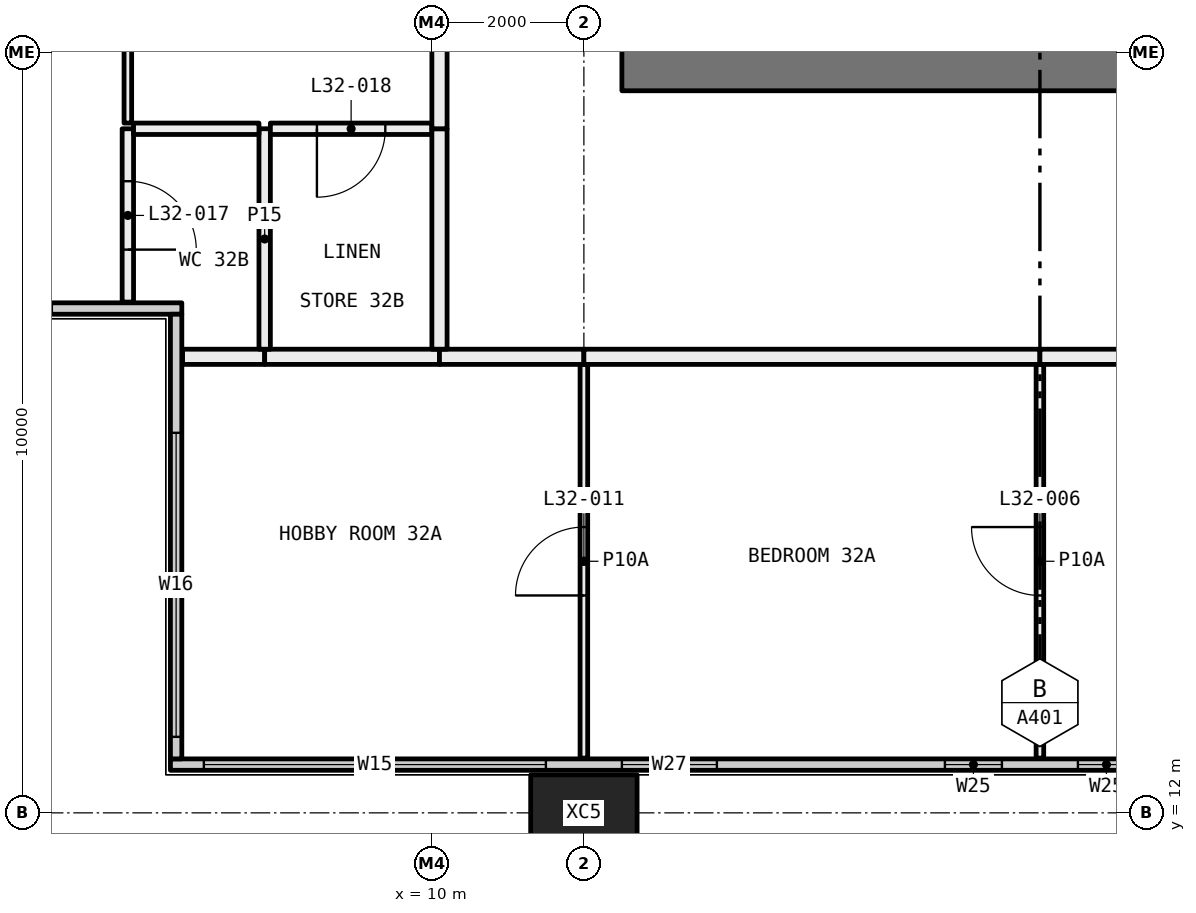
"""IFC4 building model, lengths in metres.
Left out: names, types, materials, properties, quantities, classifications, styles, units other than length and angle.
Written with IfcOpenShell. Run it as: python <this file> out.ifc"""

import sys

from ifc_helpers import new_model, si_unit, direction, frame, frame_2d, origin, origin_2d, place, context, subcontext, project, spatial, rectangle, hollow_rectangle, extrude, element, fill, save


model = new_model("IFC4")
c1 = context("Model", 3, precision=1e-05, world=origin(), true_north=direction((0.0, 1.0)))
c2 = subcontext(c1, "Body", "Model", "MODEL_VIEW")
j1 = project(units=[si_unit("LENGTHUNIT", "METRE"), si_unit("PLANEANGLEUNIT", "RADIAN")], contexts=[c1])
p1 = place(None, origin())
s1 = spatial("IfcSite", under=j1, at=p1, CompositionType="ELEMENT")
p2 = place(p1, origin())
s2 = spatial("IfcBuilding", under=s1, at=p2, CompositionType="ELEMENT")
p3 = place(p2, frame((0.0, 0.0, 124.2)))
s3 = spatial("IfcBuildingStorey", under=s2, at=p3, CompositionType="ELEMENT", Elevation=124.2)
p4 = place(p3, frame((12.0, 12.0, -0.4), z_axis=(0.0, 0.0, 1.0), x_axis=(1.0, 0.0, 0.0)))
e1 = element("IfcColumn", 1, at=p4, inside=s3, PredefinedType="COLUMN", context=c2, shape_type="SweptSolid", body=[
    extrude(hollow_rectangle(XDim=1.4, YDim=1.0, WallThickness=0.055, at=origin_2d()), origin(), (0.0, 0.0, 1.0), 3.45),
])
p5 = place(p3, frame((6.56, 12.635, 0.0), z_axis=(0.0, 0.0, 1.0), x_axis=(1.0, 0.0, 0.0)))
e2 = element("IfcWall", 2, at=p5, inside=s3, PredefinedType="ELEMENTEDWALL", context=c2, shape_type="SweptSolid", body=[
    extrude(rectangle(XDim=58.88, YDim=0.15, at=frame_2d((29.44, 0.0))), origin(), (0.0, 0.0, 1.0), 3.05),
])
p6 = place(p5, frame((0.44, 0.0, 0.45)))
e3 = element("IfcOpeningElement", 3, at=p6, cuts=e2, PredefinedType="OPENING", context=c2, shape_type="SweptSolid", body=[
    extrude(rectangle(XDim=4.5, YDim=2.55, at=frame_2d((2.25, 1.275))), frame((0.0, 0.085, 0.0), z_axis=(0.0, -1.0, 0.0), x_axis=(1.0, 0.0, 0.0)), (0.0, 0.0, 1.0), 0.17),
])
p7 = place(p5, frame((5.94, 0.0, 0.45)))
e4 = element("IfcOpeningElement", 4, at=p7, cuts=e2, PredefinedType="OPENING", context=c2, shape_type="SweptSolid", body=[
    extrude(rectangle(XDim=1.25, YDim=2.55, at=frame_2d((0.625, 1.275))), frame((0.0, 0.085, 0.0), z_axis=(0.0, -1.0, 0.0), x_axis=(1.0, 0.0, 0.0)), (0.0, 0.0, 1.0), 0.17),
])
p8 = place(p5, frame((10.19, 0.0, 0.45)))
e5 = element("IfcOpeningElement", 5, at=p8, cuts=e2, PredefinedType="OPENING", context=c2, shape_type="SweptSolid", body=[
    extrude(rectangle(XDim=0.75, YDim=2.55, at=frame_2d((0.375, 1.275))), frame((0.0, 0.085, 0.0), z_axis=(0.0, -1.0, 0.0), x_axis=(1.0, 0.0, 0.0)), (0.0, 0.0, 1.0), 0.17),
])
p9 = place(p5, frame((11.94, 0.0, 0.45)))
e6 = element("IfcOpeningElement", 6, at=p9, cuts=e2, PredefinedType="OPENING", context=c2, shape_type="SweptSolid", body=[
    extrude(rectangle(XDim=0.75, YDim=2.55, at=frame_2d((0.375, 1.275))), frame((0.0, 0.085, 0.0), z_axis=(0.0, -1.0, 0.0), x_axis=(1.0, 0.0, 0.0)), (0.0, 0.0, 1.0), 0.17),
])
p10 = place(p5, frame((15.69, 0.0, 0.45)))
e7 = element("IfcOpeningElement", 7, at=p10, cuts=e2, PredefinedType="OPENING", context=c2, shape_type="SweptSolid", body=[
    extrude(rectangle(XDim=1.25, YDim=2.55, at=frame_2d((0.625, 1.275))), frame((0.0, 0.085, 0.0), z_axis=(0.0, -1.0, 0.0), x_axis=(1.0, 0.0, 0.0)), (0.0, 0.0, 1.0), 0.17),
])
p11 = place(p5, frame((17.94, 0.0, 0.45)))
e8 = element("IfcOpeningElement", 8, at=p11, cuts=e2, PredefinedType="OPENING", context=c2, shape_type="SweptSolid", body=[
    extrude(rectangle(XDim=1.25, YDim=2.55, at=frame_2d((0.625, 1.275))), frame((0.0, 0.085, 0.0), z_axis=(0.0, -1.0, 0.0), x_axis=(1.0, 0.0, 0.0)), (0.0, 0.0, 1.0), 0.17),
])
p12 = place(p5, frame((22.19, 0.0, 0.45)))
e9 = element("IfcOpeningElement", 9, at=p12, cuts=e2, PredefinedType="OPENING", context=c2, shape_type="SweptSolid", body=[
    extrude(rectangle(XDim=0.75, YDim=2.55, at=frame_2d((0.375, 1.275))), frame((0.0, 0.085, 0.0), z_axis=(0.0, -1.0, 0.0), x_axis=(1.0, 0.0, 0.0)), (0.0, 0.0, 1.0), 0.17),
])
p13 = place(p5, frame((23.94, 0.0, 0.45)))
e10 = element("IfcOpeningElement", 10, at=p13, cuts=e2, PredefinedType="OPENING", context=c2, shape_type="SweptSolid", body=[
    extrude(rectangle(XDim=0.75, YDim=2.55, at=frame_2d((0.375, 1.275))), frame((0.0, 0.085, 0.0), z_axis=(0.0, -1.0, 0.0), x_axis=(1.0, 0.0, 0.0)), (0.0, 0.0, 1.0), 0.17),
])
p14 = place(p5, frame((27.69, 0.0, 0.45)))
e11 = element("IfcOpeningElement", 11, at=p14, cuts=e2, PredefinedType="OPENING", context=c2, shape_type="SweptSolid", body=[
    extrude(rectangle(XDim=1.25, YDim=2.55, at=frame_2d((0.625, 1.275))), frame((0.0, 0.085, 0.0), z_axis=(0.0, -1.0, 0.0), x_axis=(1.0, 0.0, 0.0)), (0.0, 0.0, 1.0), 0.17),
])
p15 = place(p5, frame((29.94, 0.0, 0.45)))
e12 = element("IfcOpeningElement", 12, at=p15, cuts=e2, PredefinedType="OPENING", context=c2, shape_type="SweptSolid", body=[
    extrude(rectangle(XDim=1.25, YDim=2.55, at=frame_2d((0.625, 1.275))), frame((0.0, 0.085, 0.0), z_axis=(0.0, -1.0, 0.0), x_axis=(1.0, 0.0, 0.0)), (0.0, 0.0, 1.0), 0.17),
])
p16 = place(p5, frame((34.19, 0.0, 0.45)))
e13 = element("IfcOpeningElement", 13, at=p16, cuts=e2, PredefinedType="OPENING", context=c2, shape_type="SweptSolid", body=[
    extrude(rectangle(XDim=0.75, YDim=2.55, at=frame_2d((0.375, 1.275))), frame((0.0, 0.085, 0.0), z_axis=(0.0, -1.0, 0.0), x_axis=(1.0, 0.0, 0.0)), (0.0, 0.0, 1.0), 0.17),
])
p17 = place(p5, frame((35.94, 0.0, 0.45)))
e14 = element("IfcOpeningElement", 14, at=p17, cuts=e2, PredefinedType="OPENING", context=c2, shape_type="SweptSolid", body=[
    extrude(rectangle(XDim=0.75, YDim=2.55, at=frame_2d((0.375, 1.275))), frame((0.0, 0.085, 0.0), z_axis=(0.0, -1.0, 0.0), x_axis=(1.0, 0.0, 0.0)), (0.0, 0.0, 1.0), 0.17),
])
p18 = place(p5, frame((39.69, 0.0, 0.45)))
e15 = element("IfcOpeningElement", 15, at=p18, cuts=e2, PredefinedType="OPENING", context=c2, shape_type="SweptSolid", body=[
    extrude(rectangle(XDim=1.25, YDim=2.55, at=frame_2d((0.625, 1.275))), frame((0.0, 0.085, 0.0), z_axis=(0.0, -1.0, 0.0), x_axis=(1.0, 0.0, 0.0)), (0.0, 0.0, 1.0), 0.17),
])
p19 = place(p5, frame((41.94, 0.0, 0.45)))
e16 = element("IfcOpeningElement", 16, at=p19, cuts=e2, PredefinedType="OPENING", context=c2, shape_type="SweptSolid", body=[
    extrude(rectangle(XDim=1.25, YDim=2.55, at=frame_2d((0.625, 1.275))), frame((0.0, 0.085, 0.0), z_axis=(0.0, -1.0, 0.0), x_axis=(1.0, 0.0, 0.0)), (0.0, 0.0, 1.0), 0.17),
])
p20 = place(p5, frame((46.19, 0.0, 0.45)))
e17 = element("IfcOpeningElement", 17, at=p20, cuts=e2, PredefinedType="OPENING", context=c2, shape_type="SweptSolid", body=[
    extrude(rectangle(XDim=0.75, YDim=2.55, at=frame_2d((0.375, 1.275))), frame((0.0, 0.085, 0.0), z_axis=(0.0, -1.0, 0.0), x_axis=(1.0, 0.0, 0.0)), (0.0, 0.0, 1.0), 0.17),
])
p21 = place(p5, frame((47.94, 0.0, 0.45)))
e18 = element("IfcOpeningElement", 18, at=p21, cuts=e2, PredefinedType="OPENING", context=c2, shape_type="SweptSolid", body=[
    extrude(rectangle(XDim=0.75, YDim=2.55, at=frame_2d((0.375, 1.275))), frame((0.0, 0.085, 0.0), z_axis=(0.0, -1.0, 0.0), x_axis=(1.0, 0.0, 0.0)), (0.0, 0.0, 1.0), 0.17),
])
p22 = place(p5, frame((51.69, 0.0, 0.45)))
e19 = element("IfcOpeningElement", 19, at=p22, cuts=e2, PredefinedType="OPENING", context=c2, shape_type="SweptSolid", body=[
    extrude(rectangle(XDim=1.25, YDim=2.55, at=frame_2d((0.625, 1.275))), frame((0.0, 0.085, 0.0), z_axis=(0.0, -1.0, 0.0), x_axis=(1.0, 0.0, 0.0)), (0.0, 0.0, 1.0), 0.17),
])
p23 = place(p5, frame((53.94, 0.0, 0.45)))
e20 = element("IfcOpeningElement", 20, at=p23, cuts=e2, PredefinedType="OPENING", context=c2, shape_type="SweptSolid", body=[
    extrude(rectangle(XDim=4.5, YDim=2.55, at=frame_2d((2.25, 1.275))), frame((0.0, 0.085, 0.0), z_axis=(0.0, -1.0, 0.0), x_axis=(1.0, 0.0, 0.0)), (0.0, 0.0, 1.0), 0.17),
])
p24 = place(p3, frame((0.56, 18.635, 0.0), z_axis=(0.0, 0.0, 1.0), x_axis=(1.0, 0.0, 0.0)))
e21 = element("IfcWall", 21, at=p24, inside=s3, PredefinedType="ELEMENTEDWALL", context=c2, shape_type="SweptSolid", body=[
    extrude(rectangle(XDim=6.15, YDim=0.15, at=frame_2d((3.075, 0.0))), origin(), (0.0, 0.0, 1.0), 3.05),
])
p25 = place(p24, frame((0.44, 0.0, 0.45)))
e22 = element("IfcOpeningElement", 22, at=p25, cuts=e21, PredefinedType="OPENING", context=c2, shape_type="SweptSolid", body=[
    extrude(rectangle(XDim=4.0, YDim=2.55, at=frame_2d((2.0, 1.275))), frame((0.0, 0.085, 0.0), z_axis=(0.0, -1.0, 0.0), x_axis=(1.0, 0.0, 0.0)), (0.0, 0.0, 1.0), 0.17),
])
p26 = place(p3, frame((6.635, 12.71, 0.0), z_axis=(0.0, 0.0, 1.0), x_axis=(0.0, 1.0, 0.0)))
e23 = element("IfcWall", 23, at=p26, inside=s3, PredefinedType="ELEMENTEDWALL", context=c2, shape_type="SweptSolid", body=[
    extrude(rectangle(XDim=5.85, YDim=0.15, at=frame_2d((2.925, 0.0))), origin(), (0.0, 0.0, 1.0), 3.05),
])
p27 = place(p26, frame((0.29, 0.0, 0.45)))
e24 = element("IfcOpeningElement", 24, at=p27, cuts=e23, PredefinedType="OPENING", context=c2, shape_type="SweptSolid", body=[
    extrude(rectangle(XDim=4.0, YDim=2.55, at=frame_2d((2.0, 1.275))), frame((0.0, 0.085, 0.0), z_axis=(0.0, -1.0, 0.0), x_axis=(1.0, 0.0, 0.0)), (0.0, 0.0, 1.0), 0.17),
])
p28 = place(p3, frame((12.0, 12.72, 0.0), z_axis=(0.0, 0.0, 1.0), x_axis=(0.0, 1.0, 0.0)))
e25 = element("IfcWall", 25, at=p28, inside=s3, PredefinedType="PARTITIONING", context=c2, shape_type="SweptSolid", body=[
    extrude(rectangle(XDim=5.18, YDim=0.1, at=frame_2d((2.59, 0.0))), origin(), (0.0, 0.0, 1.0), 3.05),
])
p29 = place(p28, frame((2.14, 0.0, 0.0)))
e26 = element("IfcOpeningElement", 26, at=p29, cuts=e25, PredefinedType="OPENING", context=c2, shape_type="SweptSolid", body=[
    extrude(rectangle(XDim=0.9, YDim=2.1, at=frame_2d((0.45, 1.05))), frame((0.0, 0.06, 0.0), z_axis=(0.0, -1.0, 0.0), x_axis=(1.0, 0.0, 0.0)), (0.0, 0.0, 1.0), 0.12),
])
p30 = place(p3, frame((7.8, 18.0, 0.0), z_axis=(0.0, 0.0, 1.0), x_axis=(-1.0, 0.0, 0.0)))
e27 = element("IfcWall", 27, at=p30, inside=s3, PredefinedType="PARTITIONING", context=c2, shape_type="SweptSolid", body=[
    extrude(rectangle(XDim=1.08, YDim=0.2, at=frame_2d((0.54, 0.0))), origin(), (0.0, 0.0, 1.0), 3.05),
])
p31 = place(p3, frame((10.1, 18.0, 0.0), z_axis=(0.0, 0.0, 1.0), x_axis=(-1.0, 0.0, 0.0)))
e28 = element("IfcWall", 28, at=p31, inside=s3, PredefinedType="PARTITIONING", context=c2, shape_type="SweptSolid", body=[
    extrude(rectangle(XDim=2.3, YDim=0.2, at=frame_2d((1.15, 0.0))), origin(), (0.0, 0.0, 1.0), 3.05),
])
p32 = place(p3, frame((12.0, 18.0, 0.0), z_axis=(0.0, 0.0, 1.0), x_axis=(-1.0, 0.0, 0.0)))
e29 = element("IfcWall", 29, at=p32, inside=s3, PredefinedType="PARTITIONING", context=c2, shape_type="SweptSolid", body=[
    extrude(rectangle(XDim=1.9, YDim=0.2, at=frame_2d((0.95, 0.0))), origin(), (0.0, 0.0, 1.0), 3.05),
])
p33 = place(p3, frame((18.0, 12.72, 0.0), z_axis=(0.0, 0.0, 1.0), x_axis=(0.0, 1.0, 0.0)))
e30 = element("IfcWall", 30, at=p33, inside=s3, PredefinedType="PARTITIONING", context=c2, shape_type="SweptSolid", body=[
    extrude(rectangle(XDim=5.18, YDim=0.1, at=frame_2d((2.59, 0.0))), origin(), (0.0, 0.0, 1.0), 3.05),
])
p34 = place(p33, frame((2.14, 0.0, 0.0)))
e31 = element("IfcOpeningElement", 31, at=p34, cuts=e30, PredefinedType="OPENING", context=c2, shape_type="SweptSolid", body=[
    extrude(rectangle(XDim=0.9, YDim=2.1, at=frame_2d((0.45, 1.05))), frame((0.0, 0.06, 0.0), z_axis=(0.0, -1.0, 0.0), x_axis=(1.0, 0.0, 0.0)), (0.0, 0.0, 1.0), 0.12),
])
p35 = place(p3, frame((18.0, 18.0, 0.0), z_axis=(0.0, 0.0, 1.0), x_axis=(-1.0, 0.0, 0.0)))
e32 = element("IfcWall", 32, at=p35, inside=s3, PredefinedType="PARTITIONING", context=c2, shape_type="SweptSolid", body=[
    extrude(rectangle(XDim=6.0, YDim=0.2, at=frame_2d((3.0, 0.0))), origin(), (0.0, 0.0, 1.0), 3.05),
])
p36 = place(p3, frame((24.0, 18.0, 0.0), z_axis=(0.0, 0.0, 1.0), x_axis=(-1.0, 0.0, 0.0)))
e33 = element("IfcWall", 33, at=p36, inside=s3, PredefinedType="PARTITIONING", context=c2, shape_type="SweptSolid", body=[
    extrude(rectangle(XDim=6.0, YDim=0.2, at=frame_2d((3.0, 0.0))), origin(), (0.0, 0.0, 1.0), 3.05),
])
p37 = place(p36, frame((2.5, 0.0, 0.0)))
e34 = element("IfcOpeningElement", 34, at=p37, cuts=e33, PredefinedType="OPENING", context=c2, shape_type="SweptSolid", body=[
    extrude(rectangle(XDim=1.0, YDim=2.1, at=frame_2d((0.5, 1.05))), frame((0.0, 0.11, 0.0), z_axis=(0.0, -1.0, 0.0), x_axis=(1.0, 0.0, 0.0)), (0.0, 0.0, 1.0), 0.22),
])
p38 = place(p3, frame((6.0, 18.72, 0.0), z_axis=(0.0, 0.0, 1.0), x_axis=(0.0, 1.0, 0.0)))
e35 = element("IfcWall", 35, at=p38, inside=s3, PredefinedType="PARTITIONING", context=c2, shape_type="SweptSolid", body=[
    extrude(rectangle(XDim=2.28, YDim=0.15, at=frame_2d((1.14, 0.0))), origin(), (0.0, 0.0, 1.0), 3.05),
])
p39 = place(p38, frame((0.69, 0.0, 0.0)))
e36 = element("IfcOpeningElement", 36, at=p39, cuts=e35, PredefinedType="OPENING", context=c2, shape_type="SweptSolid", body=[
    extrude(rectangle(XDim=0.9, YDim=2.1, at=frame_2d((0.45, 1.05))), frame((0.0, 0.085, 0.0), z_axis=(0.0, -1.0, 0.0), x_axis=(1.0, 0.0, 0.0)), (0.0, 0.0, 1.0), 0.17),
])
p40 = place(p3, frame((6.0, 21.075, 0.0), z_axis=(0.0, 0.0, 1.0), x_axis=(0.0, 1.0, 0.0)))
e37 = element("IfcWall", 37, at=p40, inside=s3, PredefinedType="PARTITIONING", context=c2, shape_type="SweptSolid", body=[
    extrude(rectangle(XDim=2.875, YDim=0.1, at=frame_2d((1.438, 0.0))), origin(), (0.0, 0.0, 1.0), 2.45),
])
p41 = place(p3, frame((7.8, 18.1, 0.0), z_axis=(0.0, 0.0, 1.0), x_axis=(0.0, 1.0, 0.0)))
e38 = element("IfcWall", 38, at=p41, inside=s3, PredefinedType="PARTITIONING", context=c2, shape_type="SweptSolid", body=[
    extrude(rectangle(XDim=2.9, YDim=0.15, at=frame_2d((1.45, 0.0))), origin(), (0.0, 0.0, 1.0), 3.05),
])
p42 = place(p3, frame((7.725, 21.0, 0.0), z_axis=(0.0, 0.0, 1.0), x_axis=(-1.0, 0.0, 0.0)))
e39 = element("IfcWall", 39, at=p42, inside=s3, PredefinedType="PARTITIONING", context=c2, shape_type="SweptSolid", body=[
    extrude(rectangle(XDim=1.65, YDim=0.15, at=frame_2d((0.825, 0.0))), origin(), (0.0, 0.0, 1.0), 3.05),
])
p43 = place(p3, frame((10.0, 21.0, 0.0), z_axis=(0.0, 0.0, 1.0), x_axis=(-1.0, 0.0, 0.0)))
e40 = element("IfcWall", 40, at=p43, inside=s3, PredefinedType="PARTITIONING", context=c2, shape_type="SweptSolid", body=[
    extrude(rectangle(XDim=2.125, YDim=0.15, at=frame_2d((1.062, 0.0))), origin(), (0.0, 0.0, 1.0), 3.05),
])
p44 = place(p43, frame((0.613, 0.0, 0.0)))
e41 = element("IfcOpeningElement", 41, at=p44, cuts=e40, PredefinedType="OPENING", context=c2, shape_type="SweptSolid", body=[
    extrude(rectangle(XDim=0.9, YDim=2.1, at=frame_2d((0.45, 1.05))), frame((0.0, 0.085, 0.0), z_axis=(0.0, -1.0, 0.0), x_axis=(1.0, 0.0, 0.0)), (0.0, 0.0, 1.0), 0.17),
])
p45 = place(p3, frame((10.1, 18.1, 0.0), z_axis=(0.0, 0.0, 1.0), x_axis=(0.0, 1.0, 0.0)))
e42 = element("IfcWall", 42, at=p45, inside=s3, PredefinedType="PARTITIONING", context=c2, shape_type="SweptSolid", body=[
    extrude(rectangle(XDim=2.9, YDim=0.2, at=frame_2d((1.45, 0.0))), origin(), (0.0, 0.0, 1.0), 3.05),
])
p46 = place(p3, frame((10.1, 21.0, 0.0), z_axis=(0.0, 0.0, 1.0), x_axis=(0.0, 1.0, 0.0)))
e43 = element("IfcWall", 43, at=p46, inside=s3, PredefinedType="PARTITIONING", context=c2, shape_type="SweptSolid", body=[
    extrude(rectangle(XDim=3.1, YDim=0.2, at=frame_2d((1.55, 0.0))), origin(), (0.0, 0.0, 1.0), 2.45),
])
p47 = place(p3, frame((12.5, 21.825, 0.0), z_axis=(0.0, 0.0, 1.0), x_axis=(1.0, 0.0, 0.0)))
e44 = element("IfcWall", 44, at=p47, inside=s3, PredefinedType="SHEAR", context=c2, shape_type="SweptSolid", body=[
    extrude(rectangle(XDim=11.0, YDim=0.65, at=frame_2d((5.5, 0.0))), origin(), (0.0, 0.0, 1.0), 3.05),
])
p48 = place(p6, origin())
e45 = element("IfcWindow", 45, at=p48, inside=s3, PartitioningType="SINGLE_PANEL", PredefinedType="WINDOW", context=c2, shape_type="SweptSolid", body=[
    extrude(rectangle(XDim=4.5, YDim=2.55, at=frame_2d((2.25, 1.275))), frame((0.0, 0.03, 0.0), z_axis=(0.0, -1.0, 0.0), x_axis=(1.0, 0.0, 0.0)), (0.0, 0.0, 1.0), 0.06),
])
fill(e3, e45)
p49 = place(p7, origin())
e46 = element("IfcWindow", 46, at=p49, inside=s3, PartitioningType="SINGLE_PANEL", PredefinedType="WINDOW", context=c2, shape_type="SweptSolid", body=[
    extrude(rectangle(XDim=1.25, YDim=2.55, at=frame_2d((0.625, 1.275))), frame((0.0, 0.03, 0.0), z_axis=(0.0, -1.0, 0.0), x_axis=(1.0, 0.0, 0.0)), (0.0, 0.0, 1.0), 0.06),
])
fill(e4, e46)
p50 = place(p8, origin())
e47 = element("IfcWindow", 47, at=p50, inside=s3, PartitioningType="SINGLE_PANEL", PredefinedType="WINDOW", context=c2, shape_type="SweptSolid", body=[
    extrude(rectangle(XDim=0.75, YDim=2.55, at=frame_2d((0.375, 1.275))), frame((0.0, 0.03, 0.0), z_axis=(0.0, -1.0, 0.0), x_axis=(1.0, 0.0, 0.0)), (0.0, 0.0, 1.0), 0.06),
])
fill(e5, e47)
p51 = place(p9, origin())
e48 = element("IfcWindow", 48, at=p51, inside=s3, PartitioningType="SINGLE_PANEL", PredefinedType="WINDOW", context=c2, shape_type="SweptSolid", body=[
    extrude(rectangle(XDim=0.75, YDim=2.55, at=frame_2d((0.375, 1.275))), frame((0.0, 0.03, 0.0), z_axis=(0.0, -1.0, 0.0), x_axis=(1.0, 0.0, 0.0)), (0.0, 0.0, 1.0), 0.06),
])
fill(e6, e48)
p52 = place(p27, origin())
e49 = element("IfcWindow", 49, at=p52, inside=s3, PartitioningType="SINGLE_PANEL", PredefinedType="WINDOW", context=c2, shape_type="SweptSolid", body=[
    extrude(rectangle(XDim=4.0, YDim=2.55, at=frame_2d((2.0, 1.275))), frame((0.0, 0.03, 0.0), z_axis=(0.0, -1.0, 0.0), x_axis=(1.0, 0.0, 0.0)), (0.0, 0.0, 1.0), 0.06),
])
fill(e24, e49)
p53 = place(p34, origin())
e50 = element("IfcDoor", 50, at=p53, inside=s3, OperationType="SINGLE_SWING_LEFT", PredefinedType="DOOR", context=c2, shape_type="SweptSolid", body=[
    extrude(rectangle(XDim=0.9, YDim=2.1, at=frame_2d((0.45, 1.05))), frame((0.0, 0.025, 0.0), z_axis=(0.0, -1.0, 0.0), x_axis=(1.0, 0.0, 0.0)), (0.0, 0.0, 1.0), 0.05),
])
fill(e31, e50)
p54 = place(p29, origin())
e51 = element("IfcDoor", 51, at=p54, inside=s3, OperationType="SINGLE_SWING_RIGHT", PredefinedType="DOOR", context=c2, shape_type="SweptSolid", body=[
    extrude(rectangle(XDim=0.9, YDim=2.1, at=frame_2d((0.45, 1.05))), frame((0.0, 0.025, 0.0), z_axis=(0.0, -1.0, 0.0), x_axis=(1.0, 0.0, 0.0)), (0.0, 0.0, 1.0), 0.05),
])
fill(e26, e51)
p55 = place(p39, frame((0.9, 0.0, 0.0), x_axis=(-1.0, 0.0, 0.0)))
e52 = element("IfcDoor", 52, at=p55, inside=s3, OperationType="SINGLE_SWING_LEFT", PredefinedType="DOOR", context=c2, shape_type="SweptSolid", body=[
    extrude(rectangle(XDim=0.9, YDim=2.1, at=frame_2d((0.45, 1.05))), frame((0.0, 0.025, 0.0), z_axis=(0.0, -1.0, 0.0), x_axis=(1.0, 0.0, 0.0)), (0.0, 0.0, 1.0), 0.05),
])
fill(e36, e52)
p56 = place(p44, origin())
e53 = element("IfcDoor", 53, at=p56, inside=s3, OperationType="SINGLE_SWING_LEFT", PredefinedType="DOOR", context=c2, shape_type="SweptSolid", body=[
    extrude(rectangle(XDim=0.9, YDim=2.1, at=frame_2d((0.45, 1.05))), frame((0.0, 0.025, 0.0), z_axis=(0.0, -1.0, 0.0), x_axis=(1.0, 0.0, 0.0)), (0.0, 0.0, 1.0), 0.05),
])
fill(e41, e53)
save(model, sys.argv[1])
